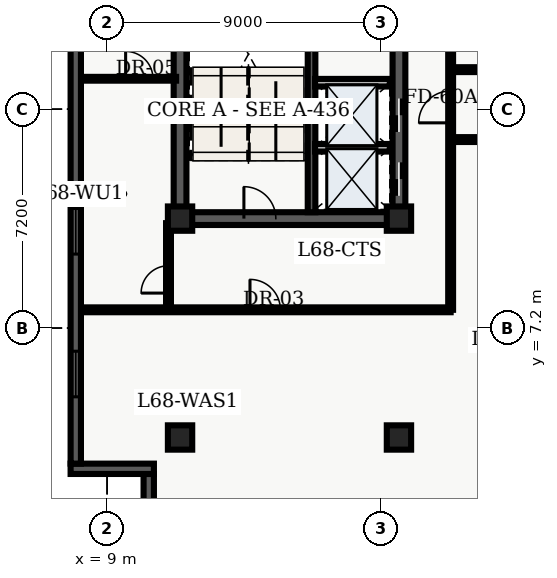
"""IFC4 building model, lengths in metres.
Left out: names, types, materials, properties, quantities, classifications, styles, units other than length and angle.
Written with IfcOpenShell. Run it as: python <this file> out.ifc"""

import sys

from ifc_helpers import new_model, entity, si_unit, converted_unit, direction, frame, origin_with_axes, origin_2d_with_axis, place, context, subcontext, project, spatial, polyline, rectangle, outline, extrude, element, fill, save


model = new_model("IFC4")
c1 = context("Model", 3, precision=1e-05, world=origin_with_axes(), true_north=direction((0.0, 1.0)))
c2 = subcontext(c1, "Body", "Model", "MODEL_VIEW")
j1 = project(units=[si_unit("LENGTHUNIT", "METRE"), converted_unit("PLANEANGLEUNIT", "DEGREE", entity("IfcPlaneAngleMeasure", 0.017), si_unit("PLANEANGLEUNIT", "RADIAN"), dimensions=[0, 0, 0, 0, 0, 0, 0])], contexts=[c1])
p1 = place(None, origin_with_axes())
s1 = spatial("IfcSite", under=j1, at=p1, CompositionType="ELEMENT")
p2 = place(p1, origin_with_axes())
s2 = spatial("IfcBuilding", under=s1, at=p2, CompositionType="ELEMENT")
p3 = place(p2, frame((0.0, 0.0, 276.3), z_axis=(0.0, 0.0, 1.0), x_axis=(1.0, 0.0, 0.0)))
s3 = spatial("IfcBuildingStorey", under=s2, at=p3, CompositionType="ELEMENT", Elevation=276.3)
p4 = place(p3, frame((11.4, 10.8, 0.0), z_axis=(0.0, 0.0, 1.0), x_axis=(0.0, 1.0, 0.0)))
e1 = element("IfcWall", 1, at=p4, inside=s3, PredefinedType="SHEAR", context=c2, shape_type="SweptSolid", body=[
    extrude(outline(polyline([(0.0, -0.21), (27.0, -0.21), (27.0, 0.21), (0.0, 0.21), (0.0, -0.21)])), origin_with_axes(), (0.0, 0.0, 1.0), 3.66),
])
p5 = place(p3, frame((11.4, 10.8, 0.0), z_axis=(0.0, 0.0, 1.0), x_axis=(1.0, 0.0, 0.0)))
e2 = element("IfcWall", 2, at=p5, inside=s3, PredefinedType="SHEAR", context=c2, shape_type="SweptSolid", body=[
    extrude(outline(polyline([(0.0, -0.21), (7.2, -0.21), (7.2, 0.21), (0.0, 0.21), (0.0, -0.21)])), origin_with_axes(), (0.0, 0.0, 1.0), 3.66),
])
p6 = place(p5, frame((2.625, 0.0, 0.0), z_axis=(0.0, 0.0, 1.0), x_axis=(1.0, 0.0, 0.0)))
e3 = element("IfcOpeningElement", 3, at=p6, cuts=e2, PredefinedType="OPENING", context=c2, shape_type="SweptSolid", body=[
    extrude(rectangle(XDim=1.05, YDim=0.44, at=origin_2d_with_axis()), origin_with_axes(), (0.0, 0.0, 1.0), 2.15),
])
p7 = place(p3, frame((18.6, 10.8, 0.0), z_axis=(0.0, 0.0, 1.0), x_axis=(0.0, 1.0, 0.0)))
e4 = element("IfcWall", 4, at=p7, inside=s3, PredefinedType="SHEAR", context=c2, shape_type="SweptSolid", body=[
    extrude(outline(polyline([(0.0, -0.21), (13.5, -0.21), (13.5, 0.21), (0.0, 0.21), (0.0, -0.21)])), origin_with_axes(), (0.0, 0.0, 1.0), 3.66),
])
p8 = place(p7, frame((1.3, 0.0, 0.0), z_axis=(0.0, 0.0, 1.0), x_axis=(1.0, 0.0, 0.0)))
e5 = element("IfcOpeningElement", 5, at=p8, cuts=e4, PredefinedType="OPENING", context=c2, shape_type="SweptSolid", body=[
    extrude(rectangle(XDim=1.1, YDim=0.44, at=origin_2d_with_axis()), origin_with_axes(), (0.0, 0.0, 1.0), 2.15),
])
p9 = place(p7, frame((3.4, 0.0, 0.0), z_axis=(0.0, 0.0, 1.0), x_axis=(1.0, 0.0, 0.0)))
e6 = element("IfcOpeningElement", 6, at=p9, cuts=e4, PredefinedType="OPENING", context=c2, shape_type="SweptSolid", body=[
    extrude(rectangle(XDim=1.1, YDim=0.44, at=origin_2d_with_axis()), origin_with_axes(), (0.0, 0.0, 1.0), 2.15),
])
p10 = place(p7, frame((11.125, 0.0, 0.0), z_axis=(0.0, 0.0, 1.0), x_axis=(1.0, 0.0, 0.0)))
e7 = element("IfcOpeningElement", 7, at=p10, cuts=e4, PredefinedType="OPENING", context=c2, shape_type="SweptSolid", body=[
    extrude(rectangle(XDim=1.05, YDim=0.44, at=origin_2d_with_axis()), origin_with_axes(), (0.0, 0.0, 1.0), 2.15),
])
p11 = place(p7, frame((6.675, 0.0, 0.0), z_axis=(0.0, 0.0, 1.0), x_axis=(1.0, 0.0, 0.0)))
e8 = element("IfcOpeningElement", 8, at=p11, cuts=e4, PredefinedType="OPENING", context=c2, shape_type="SweptSolid", body=[
    extrude(rectangle(XDim=0.95, YDim=0.44, at=origin_2d_with_axis()), origin_with_axes(), (0.0, 0.0, 1.0), 2.15),
])
p12 = place(p3, frame((15.725, 11.01, 0.0), z_axis=(0.0, 0.0, 1.0), x_axis=(0.0, 1.0, 0.0)))
e9 = element("IfcWall", 9, at=p12, inside=s3, PredefinedType="SHEAR", context=c2, shape_type="SweptSolid", body=[
    extrude(outline(polyline([(0.0, -0.125), (8.69, -0.125), (8.69, 0.125), (0.0, 0.125), (0.0, -0.125)])), origin_with_axes(), (0.0, 0.0, 1.0), 3.66),
])
for number, where, z_axis, x_axis in (
    (10, (11.4, 3.6, 0.0), (0.0, 0.0, 1.0), (1.0, 0.0, 0.0)),
    (11, (11.4, 10.8, 0.0), (0.0, 0.0, 1.0), (1.0, 0.0, 0.0)),
    (12, (18.6, 3.6, 0.0), (0.0, 0.0, 1.0), (1.0, 0.0, 0.0)),
    (13, (18.6, 10.8, 0.0), (0.0, 0.0, 1.0), (1.0, 0.0, 0.0)),
):
    element("IfcColumn", number, at=place(p3, frame(where, z_axis=z_axis, x_axis=x_axis)), inside=s3, PredefinedType="COLUMN", context=c2, shape_type="SweptSolid", body=[
        extrude(rectangle(XDim=0.8, YDim=0.8, at=origin_2d_with_axis()), origin_with_axes(), (0.0, 0.0, 1.0), 3.9),
    ])
for number, where, z_axis, x_axis in (
    (14, (15.84, 13.13, 0.0), (0.0, 0.0, 1.0), (1.0, 0.0, 0.0)),
    (15, (15.84, 15.27, 0.0), (0.0, 0.0, 1.0), (1.0, 0.0, 0.0)),
):
    element("IfcWall", number, at=place(p3, frame(where, z_axis=z_axis, x_axis=x_axis)), inside=s3, PredefinedType="SOLIDWALL", context=c2, shape_type="SweptSolid", body=[
        extrude(outline(polyline([(0.0, -0.125), (2.46, -0.125), (2.46, 0.125), (0.0, 0.125), (0.0, -0.125)])), origin_with_axes(), (0.0, 0.0, 1.0), 2.7),
    ])
p13 = place(p3, frame((8.135, 7.8, 0.0), z_axis=(0.0, 0.0, 1.0), x_axis=(1.0, 0.0, 0.0)))
e16 = element("IfcWall", 16, at=p13, inside=s3, PredefinedType="PARTITIONING", context=c2, shape_type="SweptSolid", body=[
    extrude(outline(polyline([(0.0, -0.08), (12.165, -0.08), (12.165, 0.08), (0.0, 0.08), (0.0, -0.08)])), origin_with_axes(), (0.0, 0.0, 1.0), 2.7),
])
p14 = place(p13, frame((6.065, 0.0, 0.0), z_axis=(0.0, 0.0, 1.0), x_axis=(1.0, 0.0, 0.0)))
e17 = element("IfcOpeningElement", 17, at=p14, cuts=e16, PredefinedType="OPENING", context=c2, shape_type="SweptSolid", body=[
    extrude(rectangle(XDim=1.0, YDim=0.18, at=origin_2d_with_axis()), origin_with_axes(), (0.0, 0.0, 1.0), 2.15),
])
p15 = place(p3, frame((20.3, 7.8, 0.0), z_axis=(0.0, 0.0, 1.0), x_axis=(0.0, 1.0, 0.0)))
e18 = element("IfcWall", 18, at=p15, inside=s3, PredefinedType="PARTITIONING", context=c2, shape_type="SweptSolid", body=[
    extrude(outline(polyline([(0.0, -0.08), (32.7, -0.08), (32.7, 0.08), (0.0, 0.08), (0.0, -0.08)])), origin_with_axes(), (0.0, 0.0, 1.0), 2.7),
])
p16 = place(p15, frame((14.392, 0.0, 0.0), z_axis=(0.0, 0.0, 1.0), x_axis=(1.0, 0.0, 0.0)))
e19 = element("IfcOpeningElement", 19, at=p16, cuts=e18, PredefinedType="OPENING", context=c2, shape_type="SweptSolid", body=[
    extrude(rectangle(XDim=1.0, YDim=0.18, at=origin_2d_with_axis()), origin_with_axes(), (0.0, 0.0, 1.0), 2.15),
])
p17 = place(p15, frame((18.846, 0.0, 0.0), z_axis=(0.0, 0.0, 1.0), x_axis=(1.0, 0.0, 0.0)))
e20 = element("IfcOpeningElement", 20, at=p17, cuts=e18, PredefinedType="OPENING", context=c2, shape_type="SweptSolid", body=[
    extrude(rectangle(XDim=1.0, YDim=0.18, at=origin_2d_with_axis()), origin_with_axes(), (0.0, 0.0, 1.0), 2.15),
])
p18 = place(p15, frame((23.952, 0.0, 0.0), z_axis=(0.0, 0.0, 1.0), x_axis=(1.0, 0.0, 0.0)))
e21 = element("IfcOpeningElement", 21, at=p18, cuts=e18, PredefinedType="OPENING", context=c2, shape_type="SweptSolid", body=[
    extrude(rectangle(XDim=1.0, YDim=0.18, at=origin_2d_with_axis()), origin_with_axes(), (0.0, 0.0, 1.0), 2.15),
])
p19 = place(p15, frame((27.114, 0.0, 0.0), z_axis=(0.0, 0.0, 1.0), x_axis=(1.0, 0.0, 0.0)))
e22 = element("IfcOpeningElement", 22, at=p19, cuts=e18, PredefinedType="OPENING", context=c2, shape_type="SweptSolid", body=[
    extrude(rectangle(XDim=1.0, YDim=0.18, at=origin_2d_with_axis()), origin_with_axes(), (0.0, 0.0, 1.0), 2.15),
])
p20 = place(p15, frame((6.675, 0.0, 0.0), z_axis=(0.0, 0.0, 1.0), x_axis=(1.0, 0.0, 0.0)))
e23 = element("IfcOpeningElement", 23, at=p20, cuts=e18, PredefinedType="OPENING", context=c2, shape_type="SweptSolid", body=[
    extrude(rectangle(XDim=1.05, YDim=0.18, at=origin_2d_with_axis()), origin_with_axes(), (0.0, 0.0, 1.0), 2.15),
])
p21 = place(p3, frame((11.02, 7.8, 0.0), z_axis=(0.0, 0.0, 1.0), x_axis=(0.0, 1.0, 0.0)))
e24 = element("IfcWall", 24, at=p21, inside=s3, PredefinedType="PARTITIONING", context=c2, shape_type="SweptSolid", body=[
    extrude(outline(polyline([(0.0, -0.08), (2.85, -0.08), (2.85, 0.08), (0.0, 0.08), (0.0, -0.08)])), origin_with_axes(), (0.0, 0.0, 1.0), 2.7),
])
p22 = place(p21, frame((1.0, 0.0, 0.0), z_axis=(0.0, 0.0, 1.0), x_axis=(1.0, 0.0, 0.0)))
e25 = element("IfcOpeningElement", 25, at=p22, cuts=e24, PredefinedType="OPENING", context=c2, shape_type="SweptSolid", body=[
    extrude(rectangle(XDim=0.9, YDim=0.18, at=origin_2d_with_axis()), origin_with_axes(), (0.0, 0.0, 1.0), 2.15),
])
p23 = place(p3, frame((8.135, 15.4, 0.0), z_axis=(0.0, 0.0, 1.0), x_axis=(1.0, 0.0, 0.0)))
e26 = element("IfcWall", 26, at=p23, inside=s3, PredefinedType="PARTITIONING", context=c2, shape_type="SweptSolid", body=[
    extrude(outline(polyline([(0.0, -0.062), (3.135, -0.062), (3.135, 0.062), (0.0, 0.062), (0.0, -0.062)])), origin_with_axes(), (0.0, 0.0, 1.0), 2.7),
])
p24 = place(p23, frame((1.925, 0.0, 0.0), z_axis=(0.0, 0.0, 1.0), x_axis=(1.0, 0.0, 0.0)))
e27 = element("IfcOpeningElement", 27, at=p24, cuts=e26, PredefinedType="OPENING", context=c2, shape_type="SweptSolid", body=[
    extrude(rectangle(XDim=0.9, YDim=0.145, at=origin_2d_with_axis()), origin_with_axes(), (0.0, 0.0, 1.0), 2.15),
])
p25 = place(p3, frame((20.3, 13.4, 0.0), z_axis=(0.0, 0.0, 1.0), x_axis=(1.0, 0.0, 0.0)))
e28 = element("IfcWall", 28, at=p25, inside=s3, PredefinedType="PARTITIONING", context=c2, shape_type="SweptSolid", body=[
    extrude(outline(polyline([(0.0, -0.08), (15.45, -0.08), (15.45, 0.08), (0.0, 0.08), (0.0, -0.08)])), origin_with_axes(), (0.0, 0.0, 1.0), 2.7),
])
p26 = place(p25, frame((2.34, 0.0, 0.0), z_axis=(0.0, 0.0, 1.0), x_axis=(1.0, 0.0, 0.0)))
e29 = element("IfcOpeningElement", 29, at=p26, cuts=e28, PredefinedType="OPENING", context=c2, shape_type="SweptSolid", body=[
    extrude(rectangle(XDim=1.0, YDim=0.18, at=origin_2d_with_axis()), origin_with_axes(), (0.0, 0.0, 1.0), 2.15),
])
p27 = place(p25, frame((7.011, 0.0, 0.0), z_axis=(0.0, 0.0, 1.0), x_axis=(1.0, 0.0, 0.0)))
e30 = element("IfcOpeningElement", 30, at=p27, cuts=e28, PredefinedType="OPENING", context=c2, shape_type="SweptSolid", body=[
    extrude(rectangle(XDim=1.0, YDim=0.18, at=origin_2d_with_axis()), origin_with_axes(), (0.0, 0.0, 1.0), 2.15),
])
p28 = place(p25, frame((12.445, 0.0, 0.0), z_axis=(0.0, 0.0, 1.0), x_axis=(1.0, 0.0, 0.0)))
e31 = element("IfcOpeningElement", 31, at=p28, cuts=e28, PredefinedType="OPENING", context=c2, shape_type="SweptSolid", body=[
    extrude(rectangle(XDim=1.2, YDim=0.18, at=origin_2d_with_axis()), origin_with_axes(), (0.0, 0.0, 1.0), 2.2),
])
p29 = place(p3, frame((20.3, 15.7, 0.0), z_axis=(0.0, 0.0, 1.0), x_axis=(1.0, 0.0, 0.0)))
e32 = element("IfcWall", 32, at=p29, inside=s3, PredefinedType="PARTITIONING", context=c2, shape_type="SweptSolid", body=[
    extrude(outline(polyline([(0.0, -0.08), (15.45, -0.08), (15.45, 0.08), (0.0, 0.08), (0.0, -0.08)])), origin_with_axes(), (0.0, 0.0, 1.0), 2.7),
])
p30 = place(p29, frame((7.775, 0.0, 0.0), z_axis=(0.0, 0.0, 1.0), x_axis=(1.0, 0.0, 0.0)))
e33 = element("IfcOpeningElement", 33, at=p30, cuts=e32, PredefinedType="OPENING", context=c2, shape_type="SweptSolid", body=[
    extrude(rectangle(XDim=1.0, YDim=0.18, at=origin_2d_with_axis()), origin_with_axes(), (0.0, 0.0, 1.0), 2.15),
])
p31 = place(p3, frame((10.37, 0.34, 0.0), z_axis=(0.0, 0.0, 1.0), x_axis=(0.0, 1.0, 0.0)))
e34 = element("IfcWall", 34, at=p31, inside=s3, PredefinedType="SOLIDWALL", context=c2, shape_type="SweptSolid", body=[
    extrude(outline(polyline([(0.0, -0.17), (2.06, -0.17), (2.06, 0.17), (0.0, 0.17), (0.0, -0.17)])), origin_with_axes(), (0.0, 0.0, 1.0), 3.66),
])
p32 = place(p3, frame((10.54, 2.57, 0.0), z_axis=(0.0, 0.0, 1.0), x_axis=(-1.0, 0.0, 0.0)))
e35 = element("IfcWall", 35, at=p32, inside=s3, PredefinedType="SOLIDWALL", context=c2, shape_type="SweptSolid", body=[
    extrude(outline(polyline([(0.0, -0.17), (2.74, -0.17), (2.74, 0.17), (0.0, 0.17), (0.0, -0.17)])), origin_with_axes(), (0.0, 0.0, 1.0), 3.66),
])
p33 = place(p3, frame((7.97, 2.74, 0.0), z_axis=(0.0, 0.0, 1.0), x_axis=(0.0, 1.0, 0.0)))
e36 = element("IfcWall", 36, at=p33, inside=s3, PredefinedType="SOLIDWALL", context=c2, shape_type="SweptSolid", body=[
    extrude(outline(polyline([(0.0, -0.17), (43.46, -0.17), (43.46, 0.17), (0.0, 0.17), (0.0, -0.17)])), origin_with_axes(), (0.0, 0.0, 1.0), 3.66),
])
p34 = place(p33, frame((2.948, 0.0, 0.45), z_axis=(0.0, 0.0, 1.0), x_axis=(1.0, 0.0, 0.0)))
e37 = element("IfcOpeningElement", 37, at=p34, cuts=e36, PredefinedType="OPENING", context=c2, shape_type="SweptSolid", body=[
    extrude(rectangle(XDim=1.5, YDim=0.36, at=origin_2d_with_axis()), origin_with_axes(), (0.0, 0.0, 1.0), 2.1),
])
p35 = place(p33, frame((7.643, 0.0, 0.45), z_axis=(0.0, 0.0, 1.0), x_axis=(1.0, 0.0, 0.0)))
e38 = element("IfcOpeningElement", 38, at=p35, cuts=e36, PredefinedType="OPENING", context=c2, shape_type="SweptSolid", body=[
    extrude(rectangle(XDim=1.5, YDim=0.36, at=origin_2d_with_axis()), origin_with_axes(), (0.0, 0.0, 1.0), 2.1),
])
p36 = place(p33, frame((17.034, 0.0, 0.45), z_axis=(0.0, 0.0, 1.0), x_axis=(1.0, 0.0, 0.0)))
e39 = element("IfcOpeningElement", 39, at=p36, cuts=e36, PredefinedType="OPENING", context=c2, shape_type="SweptSolid", body=[
    extrude(rectangle(XDim=1.5, YDim=0.36, at=origin_2d_with_axis()), origin_with_axes(), (0.0, 0.0, 1.0), 2.1),
])
p37 = place(p33, frame((26.426, 0.0, 0.45), z_axis=(0.0, 0.0, 1.0), x_axis=(1.0, 0.0, 0.0)))
e40 = element("IfcOpeningElement", 40, at=p37, cuts=e36, PredefinedType="OPENING", context=c2, shape_type="SweptSolid", body=[
    extrude(rectangle(XDim=1.5, YDim=0.36, at=origin_2d_with_axis()), origin_with_axes(), (0.0, 0.0, 1.0), 2.1),
])
p38 = place(p33, frame((31.571, 0.0, 0.45), z_axis=(0.0, 0.0, 1.0), x_axis=(1.0, 0.0, 0.0)))
e41 = element("IfcOpeningElement", 41, at=p38, cuts=e36, PredefinedType="OPENING", context=c2, shape_type="SweptSolid", body=[
    extrude(rectangle(XDim=1.5, YDim=0.36, at=origin_2d_with_axis()), origin_with_axes(), (0.0, 0.0, 1.0), 2.1),
])
p39 = place(p33, frame((35.817, 0.0, 0.45), z_axis=(0.0, 0.0, 1.0), x_axis=(1.0, 0.0, 0.0)))
e42 = element("IfcOpeningElement", 42, at=p39, cuts=e36, PredefinedType="OPENING", context=c2, shape_type="SweptSolid", body=[
    extrude(rectangle(XDim=1.5, YDim=0.36, at=origin_2d_with_axis()), origin_with_axes(), (0.0, 0.0, 1.0), 2.1),
])
p40 = place(p33, frame((40.512, 0.0, 0.45), z_axis=(0.0, 0.0, 1.0), x_axis=(1.0, 0.0, 0.0)))
e43 = element("IfcOpeningElement", 43, at=p40, cuts=e36, PredefinedType="OPENING", context=c2, shape_type="SweptSolid", body=[
    extrude(rectangle(XDim=1.5, YDim=0.36, at=origin_2d_with_axis()), origin_with_axes(), (0.0, 0.0, 1.0), 2.1),
])
p41 = place(p7, frame((1.3, 0.0, 0.0), z_axis=(0.0, 0.0, 1.0), x_axis=(1.0, 0.0, 0.0)))
e44 = element("IfcDoor", 44, at=p41, inside=s3, OperationType="SLIDING_TO_LEFT", PredefinedType="DOOR", context=c2, shape_type="SweptSolid", body=[
    extrude(rectangle(XDim=1.1, YDim=0.09, at=origin_2d_with_axis()), origin_with_axes(), (0.0, 0.0, 1.0), 2.15),
])
fill(e5, e44)
p42 = place(p7, frame((3.4, 0.0, 0.0), z_axis=(0.0, 0.0, 1.0), x_axis=(1.0, 0.0, 0.0)))
e45 = element("IfcDoor", 45, at=p42, inside=s3, OperationType="SLIDING_TO_RIGHT", PredefinedType="DOOR", context=c2, shape_type="SweptSolid", body=[
    extrude(rectangle(XDim=1.1, YDim=0.09, at=origin_2d_with_axis()), origin_with_axes(), (0.0, 0.0, 1.0), 2.15),
])
fill(e6, e45)
p43 = place(p5, frame((2.625, 0.0, 0.0), z_axis=(0.0, 0.0, 1.0), x_axis=(1.0, 0.0, 0.0)))
e46 = element("IfcDoor", 46, at=p43, inside=s3, OperationType="SINGLE_SWING_LEFT", PredefinedType="DOOR", context=c2, shape_type="SweptSolid", body=[
    extrude(rectangle(XDim=1.05, YDim=0.09, at=origin_2d_with_axis()), origin_with_axes(), (0.0, 0.0, 1.0), 2.15),
])
fill(e3, e46)
p44 = place(p23, frame((1.925, 0.0, 0.0), z_axis=(0.0, 0.0, 1.0), x_axis=(1.0, 0.0, 0.0)))
e47 = element("IfcDoor", 47, at=p44, inside=s3, OperationType="SINGLE_SWING_LEFT", PredefinedType="DOOR", context=c2, shape_type="SweptSolid", body=[
    extrude(rectangle(XDim=0.9, YDim=0.075, at=origin_2d_with_axis()), origin_with_axes(), (0.0, 0.0, 1.0), 2.15),
])
fill(e27, e47)
p45 = place(p21, frame((1.0, 0.0, 0.0), z_axis=(0.0, 0.0, 1.0), x_axis=(1.0, 0.0, 0.0)))
e48 = element("IfcDoor", 48, at=p45, inside=s3, OperationType="SINGLE_SWING_LEFT", PredefinedType="DOOR", context=c2, shape_type="SweptSolid", body=[
    extrude(rectangle(XDim=0.9, YDim=0.09, at=origin_2d_with_axis()), origin_with_axes(), (0.0, 0.0, 1.0), 2.15),
])
fill(e25, e48)
p46 = place(p13, frame((6.065, 0.0, 0.0), z_axis=(0.0, 0.0, 1.0), x_axis=(1.0, 0.0, 0.0)))
e49 = element("IfcDoor", 49, at=p46, inside=s3, OperationType="SINGLE_SWING_LEFT", PredefinedType="DOOR", context=c2, shape_type="SweptSolid", body=[
    extrude(rectangle(XDim=1.0, YDim=0.09, at=origin_2d_with_axis()), origin_with_axes(), (0.0, 0.0, 1.0), 2.15),
])
fill(e17, e49)
p47 = place(p15, frame((6.675, 0.0, 0.0), z_axis=(0.0, 0.0, 1.0), x_axis=(1.0, 0.0, 0.0)))
e50 = element("IfcDoor", 50, at=p47, inside=s3, OperationType="SINGLE_SWING_LEFT", PredefinedType="DOOR", context=c2, shape_type="SweptSolid", body=[
    extrude(rectangle(XDim=1.05, YDim=0.09, at=origin_2d_with_axis()), origin_with_axes(), (0.0, 0.0, 1.0), 2.15),
])
fill(e23, e50)
p48 = place(p33, frame((2.948, 0.0, 0.45), z_axis=(0.0, 0.0, 1.0), x_axis=(1.0, 0.0, 0.0)))
e51 = element("IfcWindow", 51, at=p48, inside=s3, PredefinedType="WINDOW", context=c2, shape_type="SweptSolid", body=[
    extrude(rectangle(XDim=1.5, YDim=0.09, at=origin_2d_with_axis()), origin_with_axes(), (0.0, 0.0, 1.0), 2.1),
])
fill(e37, e51)
p49 = place(p33, frame((7.643, 0.0, 0.45), z_axis=(0.0, 0.0, 1.0), x_axis=(1.0, 0.0, 0.0)))
e52 = element("IfcWindow", 52, at=p49, inside=s3, PredefinedType="WINDOW", context=c2, shape_type="SweptSolid", body=[
    extrude(rectangle(XDim=1.5, YDim=0.09, at=origin_2d_with_axis()), origin_with_axes(), (0.0, 0.0, 1.0), 2.1),
])
fill(e38, e52)
save(model, sys.argv[1])
